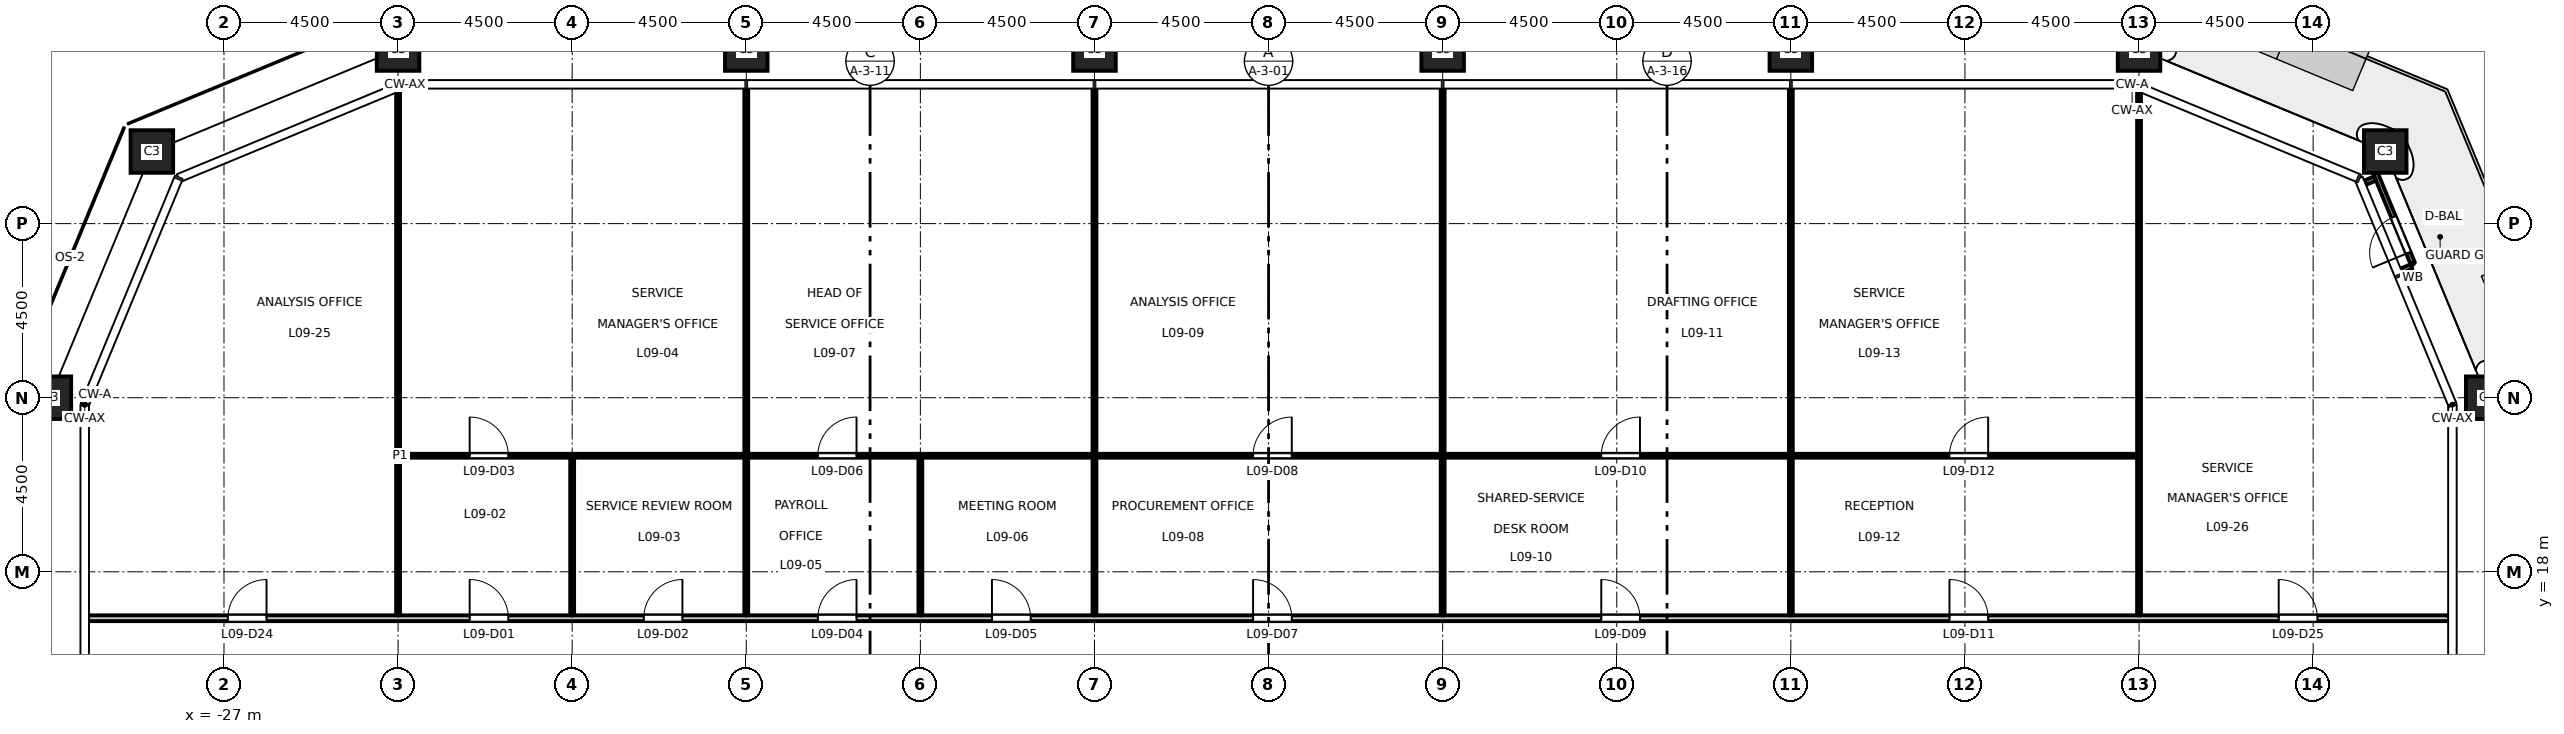
"""IFC4 building model, lengths in metres.
Left out: names, types, materials, properties, quantities, classifications, styles, units other than length and angle.
Written with IfcOpenShell. Run it as: python <this file> out.ifc"""

import sys

from ifc_helpers import new_model, si_unit, direction, frame, frame_2d, origin, origin_2d, place, context, subcontext, project, spatial, rectangle, hollow_rectangle, extrude, element, fill, save


model = new_model("IFC4")
c1 = context("Model", 3, precision=1e-05, world=origin(), true_north=direction((0.0, 1.0)))
c2 = subcontext(c1, "Body", "Model", "MODEL_VIEW")
j1 = project(units=[si_unit("LENGTHUNIT", "METRE"), si_unit("PLANEANGLEUNIT", "RADIAN")], contexts=[c1])
p1 = place(None, origin())
s1 = spatial("IfcSite", under=j1, at=p1, CompositionType="ELEMENT")
p2 = place(p1, origin())
s2 = spatial("IfcBuilding", under=s1, at=p2, CompositionType="ELEMENT")
p3 = place(p2, frame((0.0, 0.0, 44.7)))
s3 = spatial("IfcBuildingStorey", under=s2, at=p3, CompositionType="ELEMENT", Elevation=44.7)
for number, where, z_axis, x_axis in (
    (1, (31.5, 22.5, 0.0), (0.0, 0.0, 1.0), (1.0, 0.0, 0.0)),
    (2, (28.864, 28.864, 0.0), (0.0, 0.0, 1.0), (1.0, 0.0, 0.0)),
    (3, (22.5, 31.5, 0.0), (0.0, 0.0, 1.0), (1.0, 0.0, 0.0)),
    (4, (13.5, 31.5, 0.0), (0.0, 0.0, 1.0), (1.0, 0.0, 0.0)),
    (5, (4.5, 31.5, 0.0), (0.0, 0.0, 1.0), (1.0, 0.0, 0.0)),
    (6, (-4.5, 31.5, 0.0), (0.0, 0.0, 1.0), (1.0, 0.0, 0.0)),
    (7, (-13.5, 31.5, 0.0), (0.0, 0.0, 1.0), (1.0, 0.0, 0.0)),
    (8, (-22.5, 31.5, 0.0), (0.0, 0.0, 1.0), (1.0, 0.0, 0.0)),
    (9, (-28.864, 28.864, 0.0), (0.0, 0.0, 1.0), (1.0, 0.0, 0.0)),
    (10, (-31.5, 22.5, 0.0), (0.0, 0.0, 1.0), (1.0, 0.0, 0.0)),
):
    element("IfcColumn", number, at=place(p3, frame(where, z_axis=z_axis, x_axis=x_axis)), inside=s3, PredefinedType="COLUMN", context=c2, shape_type="SweptSolid", body=[
        extrude(hollow_rectangle(XDim=1.1, YDim=1.1, WallThickness=0.07, at=origin_2d()), origin(), (0.0, 0.0, 1.0), 4.5),
    ])
p4 = place(p3, frame((29.285, 25.783, 0.0), z_axis=(0.0, 0.0, 1.0), x_axis=(0.923772220778, 0.382942403136, 0.0)))
e11 = element("IfcWall", 11, at=p4, inside=s3, PredefinedType="STANDARD", context=c2, shape_type="SweptSolid", body=[
    extrude(rectangle(XDim=0.28, YDim=0.12, at=frame_2d((0.14, 0.0))), origin(), (0.0, 0.0, 1.0), 4.35),
])
p5 = place(p3, frame((28.343, 28.058, 0.0), z_axis=(0.0, 0.0, 1.0), x_axis=(0.923899985553, 0.382634050621, 0.0)))
e12 = element("IfcWall", 12, at=p5, inside=s3, PredefinedType="STANDARD", context=c2, shape_type="SweptSolid", body=[
    extrude(rectangle(XDim=0.28, YDim=0.12, at=frame_2d((0.14, 0.0))), origin(), (0.0, 0.0, 1.0), 4.35),
])
p6 = place(p3, frame((29.576, 25.969, 0.0), z_axis=(0.0, 0.0, 1.0), x_axis=(-0.382640634603, 0.923897258763, 0.0)))
e13 = element("IfcWall", 13, at=p6, inside=s3, PredefinedType="STANDARD", context=c2, shape_type="SweptSolid", body=[
    extrude(rectangle(XDim=2.538, YDim=0.12, at=frame_2d((1.269, 0.0))), origin(), (0.0, 0.0, 1.0), 4.35),
])
p7 = place(p6, frame((0.3, 0.0, 0.0)))
e14 = element("IfcOpeningElement", 14, at=p7, cuts=e13, PredefinedType="OPENING", context=c2, shape_type="SweptSolid", body=[
    extrude(rectangle(XDim=1.0, YDim=2.4, at=frame_2d((0.5, 1.2))), frame((0.0, 0.07, 0.0), z_axis=(0.0, -1.0, 0.0), x_axis=(1.0, 0.0, 0.0)), (0.0, 0.0, 1.0), 0.14),
])
p8 = place(p3, frame((-30.51, 16.8, 0.0), z_axis=(0.0, 0.0, 1.0), x_axis=(1.0, 0.0, 0.0)))
e15 = element("IfcWall", 15, at=p8, inside=s3, PredefinedType="PARTITIONING", context=c2, shape_type="SweptSolid", body=[
    extrude(rectangle(XDim=61.02, YDim=0.15, at=frame_2d((30.51, 0.0))), origin(), (0.0, 0.0, 1.0), 4.35),
])
p9 = place(p8, frame((9.86, 0.0, 0.0)))
e16 = element("IfcOpeningElement", 16, at=p9, cuts=e15, PredefinedType="OPENING", context=c2, shape_type="SweptSolid", body=[
    extrude(rectangle(XDim=1.0, YDim=2.1, at=frame_2d((0.5, 1.05))), frame((0.0, 0.085, 0.0), z_axis=(0.0, -1.0, 0.0), x_axis=(1.0, 0.0, 0.0)), (0.0, 0.0, 1.0), 0.17),
])
p10 = place(p8, frame((14.36, 0.0, 0.0)))
e17 = element("IfcOpeningElement", 17, at=p10, cuts=e15, PredefinedType="OPENING", context=c2, shape_type="SweptSolid", body=[
    extrude(rectangle(XDim=1.0, YDim=2.1, at=frame_2d((0.5, 1.05))), frame((0.0, 0.085, 0.0), z_axis=(0.0, -1.0, 0.0), x_axis=(1.0, 0.0, 0.0)), (0.0, 0.0, 1.0), 0.17),
])
p11 = place(p8, frame((18.86, 0.0, 0.0)))
e18 = element("IfcOpeningElement", 18, at=p11, cuts=e15, PredefinedType="OPENING", context=c2, shape_type="SweptSolid", body=[
    extrude(rectangle(XDim=1.0, YDim=2.1, at=frame_2d((0.5, 1.05))), frame((0.0, 0.085, 0.0), z_axis=(0.0, -1.0, 0.0), x_axis=(1.0, 0.0, 0.0)), (0.0, 0.0, 1.0), 0.17),
])
p12 = place(p8, frame((23.36, 0.0, 0.0)))
e19 = element("IfcOpeningElement", 19, at=p12, cuts=e15, PredefinedType="OPENING", context=c2, shape_type="SweptSolid", body=[
    extrude(rectangle(XDim=1.0, YDim=2.1, at=frame_2d((0.5, 1.05))), frame((0.0, 0.085, 0.0), z_axis=(0.0, -1.0, 0.0), x_axis=(1.0, 0.0, 0.0)), (0.0, 0.0, 1.0), 0.17),
])
p13 = place(p8, frame((30.11, 0.0, 0.0)))
e20 = element("IfcOpeningElement", 20, at=p13, cuts=e15, PredefinedType="OPENING", context=c2, shape_type="SweptSolid", body=[
    extrude(rectangle(XDim=1.0, YDim=2.1, at=frame_2d((0.5, 1.05))), frame((0.0, 0.085, 0.0), z_axis=(0.0, -1.0, 0.0), x_axis=(1.0, 0.0, 0.0)), (0.0, 0.0, 1.0), 0.17),
])
p14 = place(p8, frame((39.11, 0.0, 0.0)))
e21 = element("IfcOpeningElement", 21, at=p14, cuts=e15, PredefinedType="OPENING", context=c2, shape_type="SweptSolid", body=[
    extrude(rectangle(XDim=1.0, YDim=2.1, at=frame_2d((0.5, 1.05))), frame((0.0, 0.085, 0.0), z_axis=(0.0, -1.0, 0.0), x_axis=(1.0, 0.0, 0.0)), (0.0, 0.0, 1.0), 0.17),
])
p15 = place(p8, frame((48.11, 0.0, 0.0)))
e22 = element("IfcOpeningElement", 22, at=p15, cuts=e15, PredefinedType="OPENING", context=c2, shape_type="SweptSolid", body=[
    extrude(rectangle(XDim=1.0, YDim=2.1, at=frame_2d((0.5, 1.05))), frame((0.0, 0.085, 0.0), z_axis=(0.0, -1.0, 0.0), x_axis=(1.0, 0.0, 0.0)), (0.0, 0.0, 1.0), 0.17),
])
p16 = place(p8, frame((3.61, 0.0, 0.0)))
e23 = element("IfcOpeningElement", 23, at=p16, cuts=e15, PredefinedType="OPENING", context=c2, shape_type="SweptSolid", body=[
    extrude(rectangle(XDim=1.0, YDim=2.1, at=frame_2d((0.5, 1.05))), frame((0.0, 0.085, 0.0), z_axis=(0.0, -1.0, 0.0), x_axis=(1.0, 0.0, 0.0)), (0.0, 0.0, 1.0), 0.17),
])
p17 = place(p8, frame((56.62, 0.0, 0.0)))
e24 = element("IfcOpeningElement", 24, at=p17, cuts=e15, PredefinedType="OPENING", context=c2, shape_type="SweptSolid", body=[
    extrude(rectangle(XDim=1.0, YDim=2.1, at=frame_2d((0.5, 1.05))), frame((0.0, 0.085, 0.0), z_axis=(0.0, -1.0, 0.0), x_axis=(1.0, 0.0, 0.0)), (0.0, 0.0, 1.0), 0.17),
])
p18 = place(p3, frame((-22.45, 21.0, 0.0), z_axis=(0.0, 0.0, 1.0), x_axis=(1.0, 0.0, 0.0)))
e25 = element("IfcWall", 25, at=p18, inside=s3, PredefinedType="PARTITIONING", context=c2, shape_type="SweptSolid", body=[
    extrude(rectangle(XDim=44.9, YDim=0.1, at=frame_2d((22.45, 0.0))), origin(), (0.0, 0.0, 1.0), 4.35),
])
p19 = place(p18, frame((1.8, 0.0, 0.0)))
e26 = element("IfcOpeningElement", 26, at=p19, cuts=e25, PredefinedType="OPENING", context=c2, shape_type="SweptSolid", body=[
    extrude(rectangle(XDim=1.0, YDim=2.1, at=frame_2d((0.5, 1.05))), frame((0.0, 0.06, 0.0), z_axis=(0.0, -1.0, 0.0), x_axis=(1.0, 0.0, 0.0)), (0.0, 0.0, 1.0), 0.12),
])
p20 = place(p18, frame((10.8, 0.0, 0.0)))
e27 = element("IfcOpeningElement", 27, at=p20, cuts=e25, PredefinedType="OPENING", context=c2, shape_type="SweptSolid", body=[
    extrude(rectangle(XDim=1.0, YDim=2.1, at=frame_2d((0.5, 1.05))), frame((0.0, 0.06, 0.0), z_axis=(0.0, -1.0, 0.0), x_axis=(1.0, 0.0, 0.0)), (0.0, 0.0, 1.0), 0.12),
])
p21 = place(p18, frame((22.05, 0.0, 0.0)))
e28 = element("IfcOpeningElement", 28, at=p21, cuts=e25, PredefinedType="OPENING", context=c2, shape_type="SweptSolid", body=[
    extrude(rectangle(XDim=1.0, YDim=2.1, at=frame_2d((0.5, 1.05))), frame((0.0, 0.06, 0.0), z_axis=(0.0, -1.0, 0.0), x_axis=(1.0, 0.0, 0.0)), (0.0, 0.0, 1.0), 0.12),
])
p22 = place(p18, frame((31.05, 0.0, 0.0)))
e29 = element("IfcOpeningElement", 29, at=p22, cuts=e25, PredefinedType="OPENING", context=c2, shape_type="SweptSolid", body=[
    extrude(rectangle(XDim=1.0, YDim=2.1, at=frame_2d((0.5, 1.05))), frame((0.0, 0.06, 0.0), z_axis=(0.0, -1.0, 0.0), x_axis=(1.0, 0.0, 0.0)), (0.0, 0.0, 1.0), 0.12),
])
p23 = place(p18, frame((40.05, 0.0, 0.0)))
e30 = element("IfcOpeningElement", 30, at=p23, cuts=e25, PredefinedType="OPENING", context=c2, shape_type="SweptSolid", body=[
    extrude(rectangle(XDim=1.0, YDim=2.1, at=frame_2d((0.5, 1.05))), frame((0.0, 0.06, 0.0), z_axis=(0.0, -1.0, 0.0), x_axis=(1.0, 0.0, 0.0)), (0.0, 0.0, 1.0), 0.12),
])
p24 = place(p3, frame((-22.5, 16.875, 0.0), z_axis=(0.0, 0.0, 1.0), x_axis=(0.0, 1.0, 0.0)))
e31 = element("IfcWall", 31, at=p24, inside=s3, PredefinedType="PARTITIONING", context=c2, shape_type="SweptSolid", body=[
    extrude(rectangle(XDim=13.553, YDim=0.1, at=frame_2d((6.776, 0.0))), origin(), (0.0, 0.0, 1.0), 3.35),
])
p25 = place(p3, frame((-18.0, 16.875, 0.0), z_axis=(0.0, 0.0, 1.0), x_axis=(0.0, 1.0, 0.0)))
e32 = element("IfcWall", 32, at=p25, inside=s3, PredefinedType="PARTITIONING", context=c2, shape_type="SweptSolid", body=[
    extrude(rectangle(XDim=4.075, YDim=0.1, at=frame_2d((2.038, 0.0))), origin(), (0.0, 0.0, 1.0), 4.35),
])
p26 = place(p3, frame((-13.5, 16.875, 0.0), z_axis=(0.0, 0.0, 1.0), x_axis=(0.0, 1.0, 0.0)))
e33 = element("IfcWall", 33, at=p26, inside=s3, PredefinedType="PARTITIONING", context=c2, shape_type="SweptSolid", body=[
    extrude(rectangle(XDim=4.075, YDim=0.1, at=frame_2d((2.038, 0.0))), origin(), (0.0, 0.0, 1.0), 3.35),
])
p27 = place(p3, frame((-13.5, 21.05, 0.0), z_axis=(0.0, 0.0, 1.0), x_axis=(0.0, 1.0, 0.0)))
e34 = element("IfcWall", 34, at=p27, inside=s3, PredefinedType="PARTITIONING", context=c2, shape_type="SweptSolid", body=[
    extrude(rectangle(XDim=9.46, YDim=0.1, at=frame_2d((4.73, 0.0))), origin(), (0.0, 0.0, 1.0), 3.35),
])
p28 = place(p3, frame((-9.0, 16.875, 0.0), z_axis=(0.0, 0.0, 1.0), x_axis=(0.0, 1.0, 0.0)))
e35 = element("IfcWall", 35, at=p28, inside=s3, PredefinedType="PARTITIONING", context=c2, shape_type="SweptSolid", body=[
    extrude(rectangle(XDim=4.075, YDim=0.1, at=frame_2d((2.038, 0.0))), origin(), (0.0, 0.0, 1.0), 4.35),
])
p29 = place(p3, frame((-4.5, 16.875, 0.0), z_axis=(0.0, 0.0, 1.0), x_axis=(0.0, 1.0, 0.0)))
e36 = element("IfcWall", 36, at=p29, inside=s3, PredefinedType="PARTITIONING", context=c2, shape_type="SweptSolid", body=[
    extrude(rectangle(XDim=4.075, YDim=0.1, at=frame_2d((2.038, 0.0))), origin(), (0.0, 0.0, 1.0), 3.35),
])
p30 = place(p3, frame((-4.5, 21.05, 0.0), z_axis=(0.0, 0.0, 1.0), x_axis=(0.0, 1.0, 0.0)))
e37 = element("IfcWall", 37, at=p30, inside=s3, PredefinedType="PARTITIONING", context=c2, shape_type="SweptSolid", body=[
    extrude(rectangle(XDim=9.46, YDim=0.1, at=frame_2d((4.73, 0.0))), origin(), (0.0, 0.0, 1.0), 3.35),
])
p31 = place(p3, frame((4.5, 16.875, 0.0), z_axis=(0.0, 0.0, 1.0), x_axis=(0.0, 1.0, 0.0)))
e38 = element("IfcWall", 38, at=p31, inside=s3, PredefinedType="PARTITIONING", context=c2, shape_type="SweptSolid", body=[
    extrude(rectangle(XDim=4.075, YDim=0.1, at=frame_2d((2.038, 0.0))), origin(), (0.0, 0.0, 1.0), 3.35),
])
p32 = place(p3, frame((4.5, 21.05, 0.0), z_axis=(0.0, 0.0, 1.0), x_axis=(0.0, 1.0, 0.0)))
e39 = element("IfcWall", 39, at=p32, inside=s3, PredefinedType="PARTITIONING", context=c2, shape_type="SweptSolid", body=[
    extrude(rectangle(XDim=9.46, YDim=0.1, at=frame_2d((4.73, 0.0))), origin(), (0.0, 0.0, 1.0), 3.35),
])
p33 = place(p3, frame((13.5, 16.875, 0.0), z_axis=(0.0, 0.0, 1.0), x_axis=(0.0, 1.0, 0.0)))
e40 = element("IfcWall", 40, at=p33, inside=s3, PredefinedType="PARTITIONING", context=c2, shape_type="SweptSolid", body=[
    extrude(rectangle(XDim=4.075, YDim=0.1, at=frame_2d((2.038, 0.0))), origin(), (0.0, 0.0, 1.0), 3.35),
])
p34 = place(p3, frame((13.5, 21.05, 0.0), z_axis=(0.0, 0.0, 1.0), x_axis=(0.0, 1.0, 0.0)))
e41 = element("IfcWall", 41, at=p34, inside=s3, PredefinedType="PARTITIONING", context=c2, shape_type="SweptSolid", body=[
    extrude(rectangle(XDim=9.46, YDim=0.1, at=frame_2d((4.73, 0.0))), origin(), (0.0, 0.0, 1.0), 3.35),
])
p35 = place(p3, frame((22.5, 16.875, 0.0), z_axis=(0.0, 0.0, 1.0), x_axis=(0.0, 1.0, 0.0)))
e42 = element("IfcWall", 42, at=p35, inside=s3, PredefinedType="PARTITIONING", context=c2, shape_type="SweptSolid", body=[
    extrude(rectangle(XDim=13.553, YDim=0.1, at=frame_2d((6.776, 0.0))), origin(), (0.0, 0.0, 1.0), 3.35),
])
p36 = place(p7, origin())
e43 = element("IfcDoor", 43, at=p36, inside=s3, OperationType="SINGLE_SWING_LEFT", PredefinedType="DOOR", context=c2, shape_type="SweptSolid", body=[
    extrude(rectangle(XDim=1.0, YDim=2.4, at=frame_2d((0.5, 1.2))), frame((0.0, 0.025, 0.0), z_axis=(0.0, -1.0, 0.0), x_axis=(1.0, 0.0, 0.0)), (0.0, 0.0, 1.0), 0.05),
])
fill(e14, e43)
p37 = place(p9, origin())
e44 = element("IfcDoor", 44, at=p37, inside=s3, OperationType="SINGLE_SWING_LEFT", PredefinedType="DOOR", context=c2, shape_type="SweptSolid", body=[
    extrude(rectangle(XDim=1.0, YDim=2.1, at=frame_2d((0.5, 1.05))), frame((0.0, 0.025, 0.0), z_axis=(0.0, -1.0, 0.0), x_axis=(1.0, 0.0, 0.0)), (0.0, 0.0, 1.0), 0.05),
])
fill(e16, e44)
p38 = place(p10, origin())
e45 = element("IfcDoor", 45, at=p38, inside=s3, OperationType="SINGLE_SWING_RIGHT", PredefinedType="DOOR", context=c2, shape_type="SweptSolid", body=[
    extrude(rectangle(XDim=1.0, YDim=2.1, at=frame_2d((0.5, 1.05))), frame((0.0, 0.025, 0.0), z_axis=(0.0, -1.0, 0.0), x_axis=(1.0, 0.0, 0.0)), (0.0, 0.0, 1.0), 0.05),
])
fill(e17, e45)
p39 = place(p19, origin())
e46 = element("IfcDoor", 46, at=p39, inside=s3, OperationType="SINGLE_SWING_LEFT", PredefinedType="DOOR", context=c2, shape_type="SweptSolid", body=[
    extrude(rectangle(XDim=1.0, YDim=2.1, at=frame_2d((0.5, 1.05))), frame((0.0, 0.025, 0.0), z_axis=(0.0, -1.0, 0.0), x_axis=(1.0, 0.0, 0.0)), (0.0, 0.0, 1.0), 0.05),
])
fill(e26, e46)
p40 = place(p11, origin())
e47 = element("IfcDoor", 47, at=p40, inside=s3, OperationType="SINGLE_SWING_RIGHT", PredefinedType="DOOR", context=c2, shape_type="SweptSolid", body=[
    extrude(rectangle(XDim=1.0, YDim=2.1, at=frame_2d((0.5, 1.05))), frame((0.0, 0.025, 0.0), z_axis=(0.0, -1.0, 0.0), x_axis=(1.0, 0.0, 0.0)), (0.0, 0.0, 1.0), 0.05),
])
fill(e18, e47)
p41 = place(p12, origin())
e48 = element("IfcDoor", 48, at=p41, inside=s3, OperationType="SINGLE_SWING_LEFT", PredefinedType="DOOR", context=c2, shape_type="SweptSolid", body=[
    extrude(rectangle(XDim=1.0, YDim=2.1, at=frame_2d((0.5, 1.05))), frame((0.0, 0.025, 0.0), z_axis=(0.0, -1.0, 0.0), x_axis=(1.0, 0.0, 0.0)), (0.0, 0.0, 1.0), 0.05),
])
fill(e19, e48)
p42 = place(p20, origin())
e49 = element("IfcDoor", 49, at=p42, inside=s3, OperationType="SINGLE_SWING_RIGHT", PredefinedType="DOOR", context=c2, shape_type="SweptSolid", body=[
    extrude(rectangle(XDim=1.0, YDim=2.1, at=frame_2d((0.5, 1.05))), frame((0.0, 0.025, 0.0), z_axis=(0.0, -1.0, 0.0), x_axis=(1.0, 0.0, 0.0)), (0.0, 0.0, 1.0), 0.05),
])
fill(e27, e49)
p43 = place(p13, origin())
e50 = element("IfcDoor", 50, at=p43, inside=s3, OperationType="SINGLE_SWING_LEFT", PredefinedType="DOOR", context=c2, shape_type="SweptSolid", body=[
    extrude(rectangle(XDim=1.0, YDim=2.1, at=frame_2d((0.5, 1.05))), frame((0.0, 0.025, 0.0), z_axis=(0.0, -1.0, 0.0), x_axis=(1.0, 0.0, 0.0)), (0.0, 0.0, 1.0), 0.05),
])
fill(e20, e50)
p44 = place(p21, origin())
e51 = element("IfcDoor", 51, at=p44, inside=s3, OperationType="SINGLE_SWING_RIGHT", PredefinedType="DOOR", context=c2, shape_type="SweptSolid", body=[
    extrude(rectangle(XDim=1.0, YDim=2.1, at=frame_2d((0.5, 1.05))), frame((0.0, 0.025, 0.0), z_axis=(0.0, -1.0, 0.0), x_axis=(1.0, 0.0, 0.0)), (0.0, 0.0, 1.0), 0.05),
])
fill(e28, e51)
p45 = place(p14, origin())
e52 = element("IfcDoor", 52, at=p45, inside=s3, OperationType="SINGLE_SWING_LEFT", PredefinedType="DOOR", context=c2, shape_type="SweptSolid", body=[
    extrude(rectangle(XDim=1.0, YDim=2.1, at=frame_2d((0.5, 1.05))), frame((0.0, 0.025, 0.0), z_axis=(0.0, -1.0, 0.0), x_axis=(1.0, 0.0, 0.0)), (0.0, 0.0, 1.0), 0.05),
])
fill(e21, e52)
p46 = place(p22, origin())
e53 = element("IfcDoor", 53, at=p46, inside=s3, OperationType="SINGLE_SWING_RIGHT", PredefinedType="DOOR", context=c2, shape_type="SweptSolid", body=[
    extrude(rectangle(XDim=1.0, YDim=2.1, at=frame_2d((0.5, 1.05))), frame((0.0, 0.025, 0.0), z_axis=(0.0, -1.0, 0.0), x_axis=(1.0, 0.0, 0.0)), (0.0, 0.0, 1.0), 0.05),
])
fill(e29, e53)
p47 = place(p15, origin())
e54 = element("IfcDoor", 54, at=p47, inside=s3, OperationType="SINGLE_SWING_LEFT", PredefinedType="DOOR", context=c2, shape_type="SweptSolid", body=[
    extrude(rectangle(XDim=1.0, YDim=2.1, at=frame_2d((0.5, 1.05))), frame((0.0, 0.025, 0.0), z_axis=(0.0, -1.0, 0.0), x_axis=(1.0, 0.0, 0.0)), (0.0, 0.0, 1.0), 0.05),
])
fill(e22, e54)
p48 = place(p23, origin())
e55 = element("IfcDoor", 55, at=p48, inside=s3, OperationType="SINGLE_SWING_RIGHT", PredefinedType="DOOR", context=c2, shape_type="SweptSolid", body=[
    extrude(rectangle(XDim=1.0, YDim=2.1, at=frame_2d((0.5, 1.05))), frame((0.0, 0.025, 0.0), z_axis=(0.0, -1.0, 0.0), x_axis=(1.0, 0.0, 0.0)), (0.0, 0.0, 1.0), 0.05),
])
fill(e30, e55)
p49 = place(p16, origin())
e56 = element("IfcDoor", 56, at=p49, inside=s3, OperationType="SINGLE_SWING_RIGHT", PredefinedType="DOOR", context=c2, shape_type="SweptSolid", body=[
    extrude(rectangle(XDim=1.0, YDim=2.1, at=frame_2d((0.5, 1.05))), frame((0.0, 0.025, 0.0), z_axis=(0.0, -1.0, 0.0), x_axis=(1.0, 0.0, 0.0)), (0.0, 0.0, 1.0), 0.05),
])
fill(e23, e56)
p50 = place(p17, origin())
e57 = element("IfcDoor", 57, at=p50, inside=s3, OperationType="SINGLE_SWING_LEFT", PredefinedType="DOOR", context=c2, shape_type="SweptSolid", body=[
    extrude(rectangle(XDim=1.0, YDim=2.1, at=frame_2d((0.5, 1.05))), frame((0.0, 0.025, 0.0), z_axis=(0.0, -1.0, 0.0), x_axis=(1.0, 0.0, 0.0)), (0.0, 0.0, 1.0), 0.05),
])
fill(e24, e57)
save(model, sys.argv[1])
